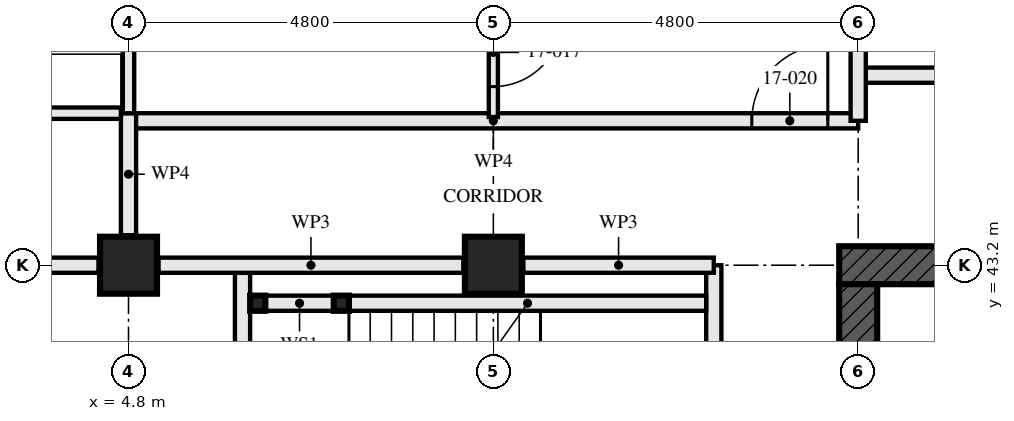
"""IFC4 building model, lengths in metres.
Left out: names, types, materials, properties, quantities, classifications, styles, units other than length and angle.
Written with IfcOpenShell. Run it as: python <this file> out.ifc"""

import sys

from ifc_helpers import new_model, si_unit, direction, frame, frame_2d, origin, origin_2d, place, context, subcontext, project, spatial, rectangle, hollow_rectangle, extrude, element, fill, save


model = new_model("IFC4")
c1 = context("Model", 3, precision=1e-05, world=origin(), true_north=direction((0.0, 1.0)))
c2 = subcontext(c1, "Body", "Model", "MODEL_VIEW")
j1 = project(units=[si_unit("LENGTHUNIT", "METRE"), si_unit("PLANEANGLEUNIT", "RADIAN")], contexts=[c1])
p1 = place(None, origin())
s1 = spatial("IfcSite", under=j1, at=p1, CompositionType="ELEMENT")
p2 = place(p1, origin())
s2 = spatial("IfcBuilding", under=s1, at=p2, CompositionType="ELEMENT")
p3 = place(p2, frame((0.0, 0.0, 65.5)))
s3 = spatial("IfcBuildingStorey", under=s2, at=p3, CompositionType="ELEMENT", Elevation=65.5)
for number, where, z_axis, x_axis in (
    (1, (4.8, 43.2, 0.0), (0.0, 0.0, 1.0), (0.0, 1.0, 0.0)),
    (2, (9.6, 43.2, 0.0), (0.0, 0.0, 1.0), (0.0, 1.0, 0.0)),
):
    element("IfcColumn", number, at=place(p3, frame(where, z_axis=z_axis, x_axis=x_axis)), inside=s3, PredefinedType="COLUMN", context=c2, shape_type="SweptSolid", body=[
        extrude(hollow_rectangle(XDim=0.75, YDim=0.75, WallThickness=0.08, at=origin_2d()), origin(), (0.0, 0.0, 1.0), 3.5),
    ])
p4 = place(p3, frame((29.05, 43.2, -0.17), z_axis=(0.0, 0.0, 1.0), x_axis=(-1.0, 0.0, 0.0)))
e3 = element("IfcWall", 3, at=p4, inside=s3, PredefinedType="SHEAR", context=c2, shape_type="SweptSolid", body=[
    extrude(rectangle(XDim=14.9, YDim=0.5, at=frame_2d((7.45, 0.0))), origin(), (0.0, 0.0, 1.0), 3.5),
])
p5 = place(p4, frame((6.85, 0.0, 0.17)))
e4 = element("IfcOpeningElement", 4, at=p5, cuts=e3, PredefinedType="OPENING", context=c2, shape_type="SweptSolid", body=[
    extrude(rectangle(XDim=1.2, YDim=2.1, at=frame_2d((0.6, 1.05))), frame((0.0, 0.26, 0.0), z_axis=(0.0, -1.0, 0.0), x_axis=(1.0, 0.0, 0.0)), (0.0, 0.0, 1.0), 0.521),
])
p6 = place(p3, frame((14.4, 42.95, -0.17), z_axis=(0.0, 0.0, 1.0), x_axis=(0.0, -1.0, 0.0)))
e5 = element("IfcWall", 5, at=p6, inside=s3, PredefinedType="SHEAR", context=c2, shape_type="SweptSolid", body=[
    extrude(rectangle(XDim=13.9, YDim=0.5, at=frame_2d((6.95, 0.0))), origin(), (0.0, 0.0, 1.0), 3.5),
])
p7 = place(p6, frame((6.35, 0.0, 0.17)))
e6 = element("IfcOpeningElement", 6, at=p7, cuts=e5, PredefinedType="OPENING", context=c2, shape_type="SweptSolid", body=[
    extrude(rectangle(XDim=1.2, YDim=2.1, at=frame_2d((0.6, 1.05))), frame((0.0, 0.26, 0.0), z_axis=(0.0, -1.0, 0.0), x_axis=(1.0, 0.0, 0.0)), (0.0, 0.0, 1.0), 0.521),
])
for number, where, z_axis, x_axis in (
    (7, (6.5, 42.7, 0.0), (0.0, 0.0, 1.0), (1.0, 0.0, 0.0)),
    (8, (7.6, 42.7, 0.0), (0.0, 0.0, 1.0), (1.0, 0.0, 0.0)),
):
    element("IfcColumn", number, at=place(p3, frame(where, z_axis=z_axis, x_axis=x_axis)), inside=s3, PredefinedType="COLUMN", context=c2, shape_type="SweptSolid", body=[
        extrude(hollow_rectangle(XDim=0.2, YDim=0.2, WallThickness=0.008, at=origin_2d()), origin(), (0.0, 0.0, 1.0), 3.33),
    ])
p8 = place(p3, frame((6.6, 42.7, 0.0), z_axis=(0.0, 0.0, 1.0), x_axis=(1.0, 0.0, 0.0)))
e9 = element("IfcWall", 9, at=p8, inside=s3, PredefinedType="SOLIDWALL", context=c2, shape_type="SweptSolid", body=[
    extrude(rectangle(XDim=0.9, YDim=0.2, at=frame_2d((0.45, 0.0))), origin(), (0.0, 0.0, 1.0), 2.99),
])
p9 = place(p3, frame((7.7, 42.7, 0.0), z_axis=(0.0, 0.0, 1.0), x_axis=(1.0, 0.0, 0.0)))
e10 = element("IfcWall", 10, at=p9, inside=s3, PredefinedType="SOLIDWALL", context=c2, shape_type="SweptSolid", body=[
    extrude(rectangle(XDim=4.7, YDim=0.2, at=frame_2d((2.35, 0.0))), origin(), (0.0, 0.0, 1.0), 2.99),
])
p10 = place(p3, frame((6.3, 43.1, 0.0), z_axis=(0.0, 0.0, 1.0), x_axis=(0.0, -1.0, 0.0)))
e11 = element("IfcWall", 11, at=p10, inside=s3, PredefinedType="SOLIDWALL", context=c2, shape_type="SweptSolid", body=[
    extrude(rectangle(XDim=3.3, YDim=0.2, at=frame_2d((1.65, 0.0))), origin(), (0.0, 0.0, 1.0), 3.33),
])
p11 = place(p3, frame((12.5, 43.2, 0.0), z_axis=(0.0, 0.0, 1.0), x_axis=(0.0, -1.0, 0.0)))
e12 = element("IfcWall", 12, at=p11, inside=s3, PredefinedType="PARTITIONING", context=c2, shape_type="SweptSolid", body=[
    extrude(rectangle(XDim=14.4, YDim=0.2, at=frame_2d((7.2, 0.0))), origin(), (0.0, 0.0, 1.0), 2.55),
])
p12 = place(p11, frame((1.4, 0.0, 0.0)))
e13 = element("IfcOpeningElement", 13, at=p12, cuts=e12, PredefinedType="OPENING", context=c2, shape_type="SweptSolid", body=[
    extrude(rectangle(XDim=1.0, YDim=2.1, at=frame_2d((0.5, 1.05))), frame((0.0, 0.111, 0.0), z_axis=(0.0, -1.0, 0.0), x_axis=(1.0, 0.0, 0.0)), (0.0, 0.0, 1.0), 0.221),
])
p13 = place(p11, frame((10.0, 0.0, 0.0)))
e14 = element("IfcOpeningElement", 14, at=p13, cuts=e12, PredefinedType="OPENING", context=c2, shape_type="SweptSolid", body=[
    extrude(rectangle(XDim=1.0, YDim=2.1, at=frame_2d((0.5, 1.05))), frame((0.0, 0.111, 0.0), z_axis=(0.0, -1.0, 0.0), x_axis=(1.0, 0.0, 0.0)), (0.0, 0.0, 1.0), 0.221),
])
p14 = place(p3, frame((4.8, 48.2, 0.0), z_axis=(0.0, 0.0, 1.0), x_axis=(0.0, -1.0, 0.0)))
e15 = element("IfcWall", 15, at=p14, inside=s3, PredefinedType="PARTITIONING", context=c2, shape_type="SweptSolid", body=[
    extrude(rectangle(XDim=3.0, YDim=0.15, at=frame_2d((1.5, 0.0))), origin(), (0.0, 0.0, 1.0), 2.55),
])
p15 = place(p14, frame((1.05, 0.0, 0.0)))
e16 = element("IfcOpeningElement", 16, at=p15, cuts=e15, PredefinedType="OPENING", context=c2, shape_type="SweptSolid", body=[
    extrude(rectangle(XDim=0.9, YDim=2.1, at=frame_2d((0.45, 1.05))), frame((0.0, 0.085, 0.0), z_axis=(0.0, -1.0, 0.0), x_axis=(1.0, 0.0, 0.0)), (0.0, 0.0, 1.0), 0.171),
])
p16 = place(p3, frame((9.6, 49.8, 0.0), z_axis=(0.0, 0.0, 1.0), x_axis=(0.0, -1.0, 0.0)))
e17 = element("IfcWall", 17, at=p16, inside=s3, PredefinedType="PARTITIONING", context=c2, shape_type="SweptSolid", body=[
    extrude(rectangle(XDim=4.65, YDim=0.12, at=frame_2d((2.325, 0.0))), origin(), (0.0, 0.0, 1.0), 2.55),
])
p17 = place(p16, frame((3.35, 0.0, 0.0)))
e18 = element("IfcOpeningElement", 18, at=p17, cuts=e17, PredefinedType="OPENING", context=c2, shape_type="SweptSolid", body=[
    extrude(rectangle(XDim=0.9, YDim=2.1, at=frame_2d((0.45, 1.05))), frame((0.0, 0.071, 0.0), z_axis=(0.0, -1.0, 0.0), x_axis=(1.0, 0.0, 0.0)), (0.0, 0.0, 1.0), 0.141),
])
p18 = place(p3, frame((14.4, 45.1, 0.0), z_axis=(0.0, 0.0, 1.0), x_axis=(-1.0, 0.0, 0.0)))
e19 = element("IfcWall", 19, at=p18, inside=s3, PredefinedType="PARTITIONING", context=c2, shape_type="SweptSolid", body=[
    extrude(rectangle(XDim=9.6, YDim=0.2, at=frame_2d((4.8, 0.0))), origin(), (0.0, 0.0, 1.0), 3.33),
])
p19 = place(p18, frame((0.4, 0.0, 0.0)))
e20 = element("IfcOpeningElement", 20, at=p19, cuts=e19, PredefinedType="OPENING", context=c2, shape_type="SweptSolid", body=[
    extrude(rectangle(XDim=1.0, YDim=2.1, at=frame_2d((0.5, 1.05))), frame((0.0, 0.111, 0.0), z_axis=(0.0, -1.0, 0.0), x_axis=(1.0, 0.0, 0.0)), (0.0, 0.0, 1.0), 0.221),
])
p20 = place(p3, frame((4.8, 45.2, 0.0), z_axis=(0.0, 0.0, 1.0), x_axis=(0.0, -1.0, 0.0)))
e21 = element("IfcWall", 21, at=p20, inside=s3, PredefinedType="PARTITIONING", context=c2, shape_type="SweptSolid", body=[
    extrude(rectangle(XDim=1.605, YDim=0.2, at=frame_2d((0.802, 0.0))), origin(), (0.0, 0.0, 1.0), 3.33),
])
p21 = place(p3, frame((28.8, 45.7, 0.0), z_axis=(0.0, 0.0, 1.0), x_axis=(-1.0, 0.0, 0.0)))
e22 = element("IfcWall", 22, at=p21, inside=s3, PredefinedType="PARTITIONING", context=c2, shape_type="SweptSolid", body=[
    extrude(rectangle(XDim=14.4, YDim=0.2, at=frame_2d((7.2, 0.0))), origin(), (0.0, 0.0, 1.0), 3.33),
])
p22 = place(p21, frame((0.4, 0.0, 0.0)))
e23 = element("IfcOpeningElement", 23, at=p22, cuts=e22, PredefinedType="OPENING", context=c2, shape_type="SweptSolid", body=[
    extrude(rectangle(XDim=1.0, YDim=2.1, at=frame_2d((0.5, 1.05))), frame((0.0, 0.111, 0.0), z_axis=(0.0, -1.0, 0.0), x_axis=(1.0, 0.0, 0.0)), (0.0, 0.0, 1.0), 0.221),
])
p23 = place(p3, frame((12.5, 43.2, 0.0), z_axis=(0.0, 0.0, 1.0), x_axis=(-1.0, 0.0, 0.0)))
e24 = element("IfcWall", 24, at=p23, inside=s3, PredefinedType="PARTITIONING", context=c2, shape_type="SweptSolid", body=[
    extrude(rectangle(XDim=2.505, YDim=0.2, at=frame_2d((1.252, 0.0))), origin(), (0.0, 0.0, 1.0), 2.32),
])
p24 = place(p3, frame((9.205, 43.2, 0.0), z_axis=(0.0, 0.0, 1.0), x_axis=(-1.0, 0.0, 0.0)))
e25 = element("IfcWall", 25, at=p24, inside=s3, PredefinedType="PARTITIONING", context=c2, shape_type="SweptSolid", body=[
    extrude(rectangle(XDim=4.01, YDim=0.2, at=frame_2d((2.005, 0.0))), origin(), (0.0, 0.0, 1.0), 2.32),
])
p25 = place(p3, frame((4.405, 43.2, 0.0), z_axis=(0.0, 0.0, 1.0), x_axis=(-1.0, 0.0, 0.0)))
e26 = element("IfcWall", 26, at=p25, inside=s3, PredefinedType="PARTITIONING", context=c2, shape_type="SweptSolid", body=[
    extrude(rectangle(XDim=4.085, YDim=0.2, at=frame_2d((2.042, 0.0))), origin(), (0.0, 0.0, 1.0), 2.32),
])
p26 = place(p3, frame((14.4, 45.1, 0.0), z_axis=(0.0, 0.0, 1.0), x_axis=(0.0, 1.0, 0.0)))
e27 = element("IfcWall", 27, at=p26, inside=s3, PredefinedType="PARTITIONING", context=c2, shape_type="SweptSolid", body=[
    extrude(rectangle(XDim=2.555, YDim=0.2, at=frame_2d((1.277, 0.0))), origin(), (0.0, 0.0, 1.0), 2.32),
])
p27 = place(p3, frame((4.7, 45.2, 0.0), z_axis=(0.0, 0.0, 1.0), x_axis=(-1.0, 0.0, 0.0)))
e28 = element("IfcWall", 28, at=p27, inside=s3, PredefinedType="PARTITIONING", context=c2, shape_type="SweptSolid", body=[
    extrude(rectangle(XDim=5.135, YDim=0.15, at=frame_2d((2.567, 0.0))), origin(), (0.0, 0.0, 1.0), 2.32),
])
p28 = place(p17, origin())
e29 = element("IfcDoor", 29, at=p28, inside=s3, OperationType="SINGLE_SWING_RIGHT", PredefinedType="DOOR", context=c2, shape_type="SweptSolid", body=[
    extrude(rectangle(XDim=0.9, YDim=2.1, at=frame_2d((0.45, 1.05))), frame((0.0, 0.022, 0.0), z_axis=(0.0, -1.0, 0.0), x_axis=(1.0, 0.0, 0.0)), (0.0, 0.0, 1.0), 0.044),
])
fill(e18, e29)
p29 = place(p19, frame((1.0, 0.0, 0.0), z_axis=(0.0, 0.0, 1.0), x_axis=(-1.0, 0.0, 0.0)))
e30 = element("IfcDoor", 30, at=p29, inside=s3, OperationType="SINGLE_SWING_LEFT", PredefinedType="DOOR", context=c2, shape_type="SweptSolid", body=[
    extrude(rectangle(XDim=1.0, YDim=2.1, at=frame_2d((0.5, 1.05))), frame((0.0, 0.027, 0.0), z_axis=(0.0, -1.0, 0.0), x_axis=(1.0, 0.0, 0.0)), (0.0, 0.0, 1.0), 0.054),
])
fill(e20, e30)
save(model, sys.argv[1])
